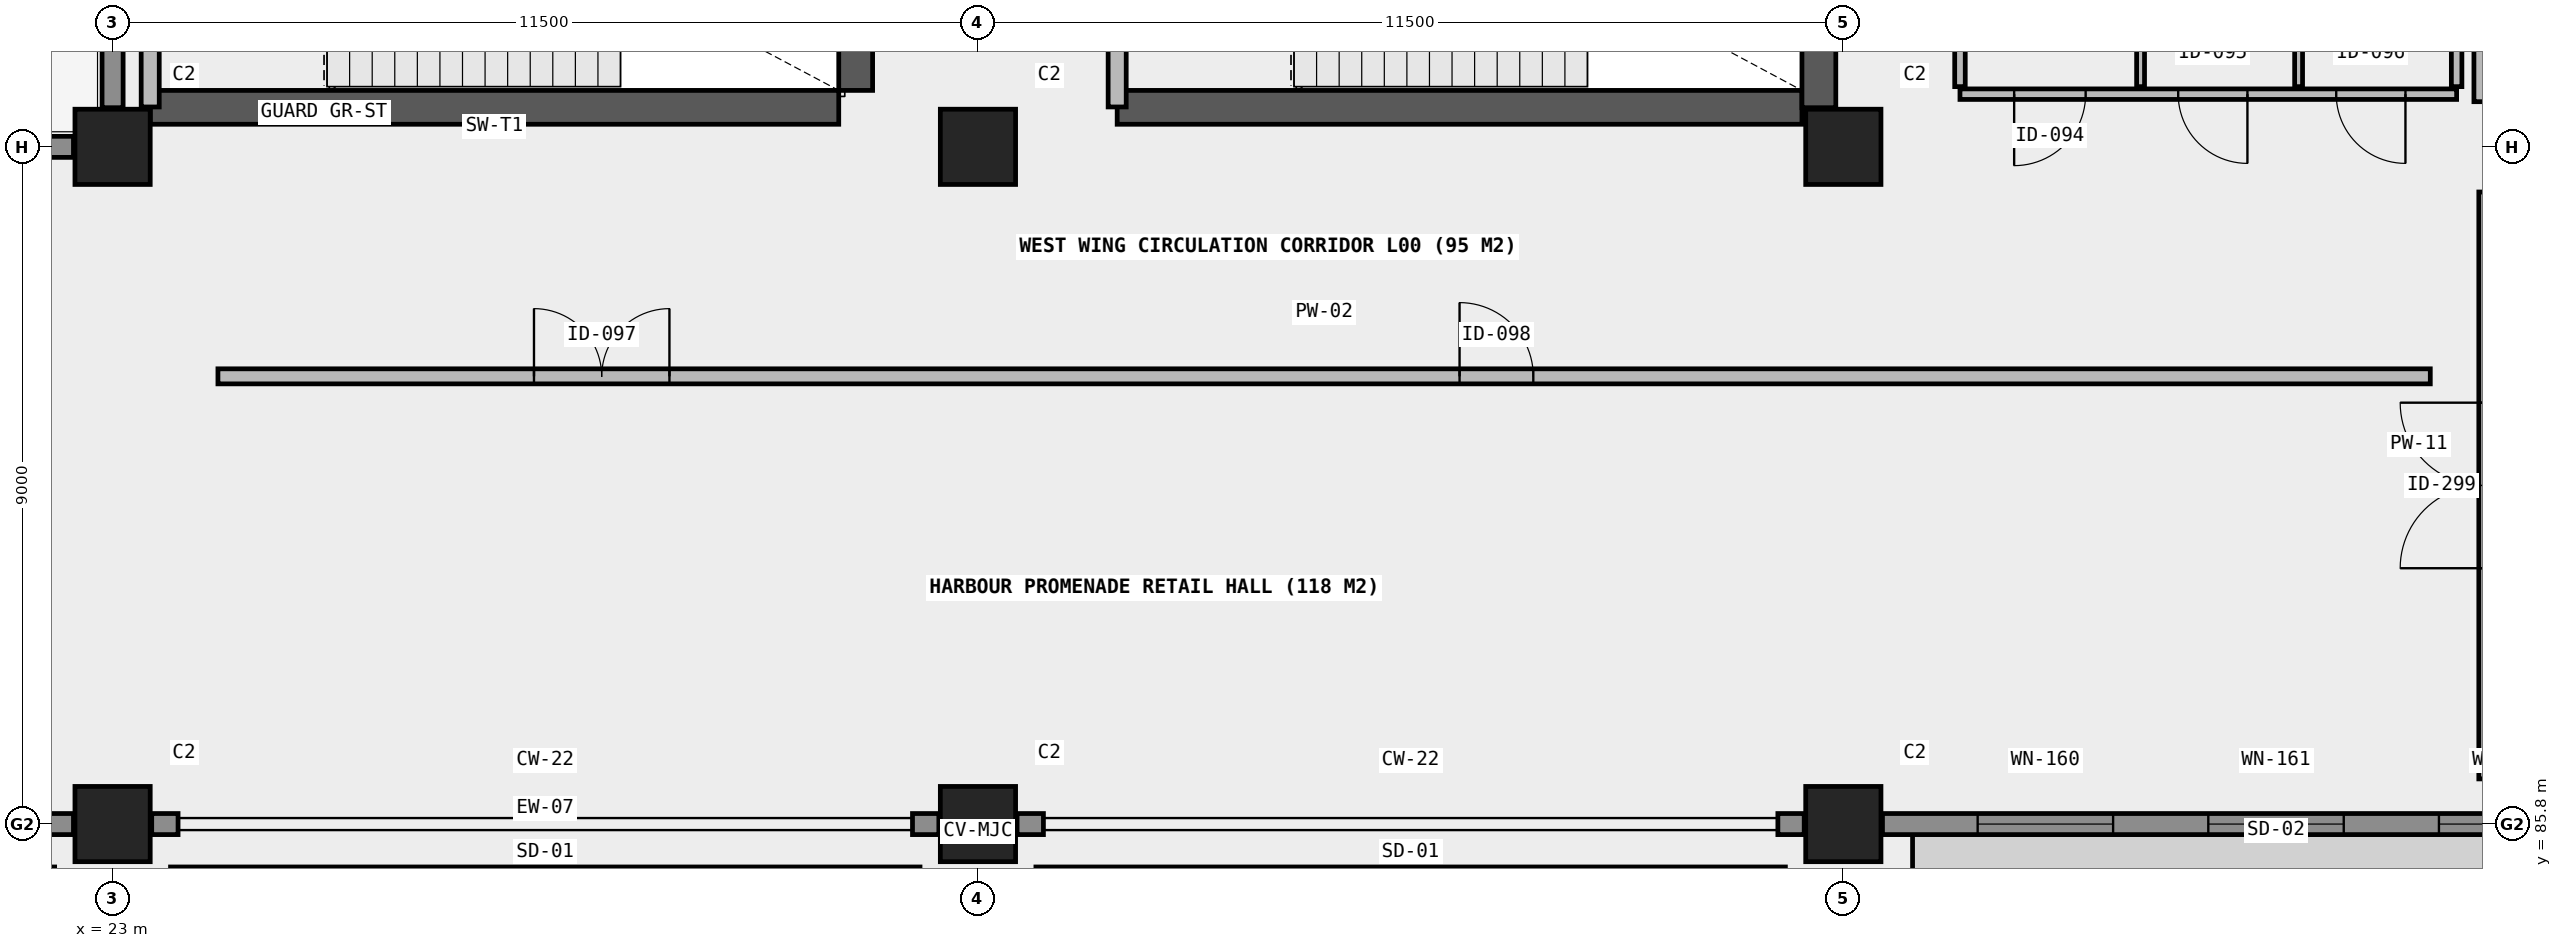
"""IFC4 building model, lengths in metres.
Left out: names, types, materials, properties, quantities, classifications, styles, units other than length and angle.
Written with IfcOpenShell. Run it as: python <this file> out.ifc"""

import sys

from ifc_helpers import new_model, si_unit, direction, frame, frame_2d, origin, origin_2d, place, context, subcontext, project, spatial, rectangle, extrude, element, fill, save


model = new_model("IFC4")
c1 = context("Model", 3, precision=1e-05, world=origin(), true_north=direction((0.0, 1.0)))
c2 = subcontext(c1, "Body", "Model", "MODEL_VIEW")
j1 = project(units=[si_unit("LENGTHUNIT", "METRE"), si_unit("PLANEANGLEUNIT", "RADIAN")], contexts=[c1])
p1 = place(None, origin())
s1 = spatial("IfcSite", under=j1, at=p1, CompositionType="ELEMENT")
p2 = place(p1, origin())
s2 = spatial("IfcBuilding", under=s1, at=p2, CompositionType="ELEMENT")
p3 = place(p2, origin())
s3 = spatial("IfcBuildingStorey", under=s2, at=p3, CompositionType="ELEMENT", Elevation=0.0)
for number, where, z_axis, x_axis in (
    (1, (23.0, 85.8, 0.0), (0.0, 0.0, 1.0), (1.0, 0.0, 0.0)),
    (2, (23.0, 94.8, 0.0), (0.0, 0.0, 1.0), (1.0, 0.0, 0.0)),
    (3, (34.5, 85.8, 0.0), (0.0, 0.0, 1.0), (1.0, 0.0, 0.0)),
    (4, (34.5, 94.8, 0.0), (0.0, 0.0, 1.0), (1.0, 0.0, 0.0)),
    (5, (46.0, 85.8, 0.0), (0.0, 0.0, 1.0), (1.0, 0.0, 0.0)),
    (6, (46.0, 94.8, 0.0), (0.0, 0.0, 1.0), (1.0, 0.0, 0.0)),
):
    element("IfcColumn", number, at=place(p3, frame(where, z_axis=z_axis, x_axis=x_axis)), inside=s3, PredefinedType="COLUMN", context=c2, shape_type="SweptSolid", body=[
        extrude(rectangle(XDim=1.0, YDim=1.0, at=origin_2d()), origin(), (0.0, 0.0, 1.0), 4.2),
    ])
p4 = place(p3, frame((23.5, 95.325, 0.0), z_axis=(0.0, 0.0, 1.0), x_axis=(1.0, 0.0, 0.0)))
e7 = element("IfcWall", 7, at=p4, inside=s3, PredefinedType="SHEAR", context=c2, shape_type="SweptSolid", body=[
    extrude(rectangle(XDim=9.15, YDim=0.45, at=frame_2d((4.575, 0.0))), origin(), (0.0, 0.0, 1.0), 4.2),
])
p5 = place(p3, frame((32.875, 95.55, 0.0), z_axis=(0.0, 0.0, 1.0), x_axis=(0.0, 1.0, 0.0)))
e8 = element("IfcWall", 8, at=p5, inside=s3, PredefinedType="SHEAR", context=c2, shape_type="SweptSolid", body=[
    extrude(rectangle(XDim=3.6, YDim=0.45, at=frame_2d((1.8, 0.0))), origin(), (0.0, 0.0, 1.0), 4.2),
])
p6 = place(p3, frame((36.35, 95.325, 0.0), z_axis=(0.0, 0.0, 1.0), x_axis=(1.0, 0.0, 0.0)))
e9 = element("IfcWall", 9, at=p6, inside=s3, PredefinedType="SHEAR", context=c2, shape_type="SweptSolid", body=[
    extrude(rectangle(XDim=9.1, YDim=0.45, at=frame_2d((4.55, 0.0))), origin(), (0.0, 0.0, 1.0), 4.2),
])
p7 = place(p3, frame((45.675, 95.32, 0.0), z_axis=(0.0, 0.0, 1.0), x_axis=(0.0, 1.0, 0.0)))
e10 = element("IfcWall", 10, at=p7, inside=s3, PredefinedType="SHEAR", context=c2, shape_type="SweptSolid", body=[
    extrude(rectangle(XDim=3.83, YDim=0.45, at=frame_2d((1.915, 0.0))), origin(), (0.0, 0.0, 1.0), 4.2),
])
p8 = place(p3, frame((12.02, 85.8, 0.0), z_axis=(0.0, 0.0, 1.0), x_axis=(1.0, 0.0, 0.0)))
e11 = element("IfcWall", 11, at=p8, inside=s3, PredefinedType="SOLIDWALL", context=c2, shape_type="SweptSolid", body=[
    extrude(rectangle(XDim=10.46, YDim=0.28, at=frame_2d((5.23, 0.0))), origin(), (0.0, 0.0, 1.0), 3.15),
])
p9 = place(p8, frame((1.265, 0.0, 0.85)))
e12 = element("IfcOpeningElement", 12, at=p9, cuts=e11, PredefinedType="OPENING", context=c2, shape_type="SweptSolid", body=[
    extrude(rectangle(XDim=1.8, YDim=1.95, at=frame_2d((0.9, 0.975))), frame((0.0, 0.15, 0.0), z_axis=(0.0, -1.0, 0.0), x_axis=(1.0, 0.0, 0.0)), (0.0, 0.0, 1.0), 0.3),
])
p10 = place(p8, frame((4.33, 0.0, 0.85)))
e13 = element("IfcOpeningElement", 13, at=p10, cuts=e11, PredefinedType="OPENING", context=c2, shape_type="SweptSolid", body=[
    extrude(rectangle(XDim=1.8, YDim=1.95, at=frame_2d((0.9, 0.975))), frame((0.0, 0.15, 0.0), z_axis=(0.0, -1.0, 0.0), x_axis=(1.0, 0.0, 0.0)), (0.0, 0.0, 1.0), 0.3),
])
p11 = place(p8, frame((7.395, 0.0, 0.85)))
e14 = element("IfcOpeningElement", 14, at=p11, cuts=e11, PredefinedType="OPENING", context=c2, shape_type="SweptSolid", body=[
    extrude(rectangle(XDim=1.8, YDim=1.95, at=frame_2d((0.9, 0.975))), frame((0.0, 0.15, 0.0), z_axis=(0.0, -1.0, 0.0), x_axis=(1.0, 0.0, 0.0)), (0.0, 0.0, 1.0), 0.3),
])
for number, where, z_axis, x_axis in (
    (15, (23.52, 85.8, 0.0), (0.0, 0.0, 1.0), (1.0, 0.0, 0.0)),
    (16, (33.63, 85.8, 0.0), (0.0, 0.0, 1.0), (1.0, 0.0, 0.0)),
    (17, (35.02, 85.8, 0.0), (0.0, 0.0, 1.0), (1.0, 0.0, 0.0)),
    (18, (45.13, 85.8, 0.0), (0.0, 0.0, 1.0), (1.0, 0.0, 0.0)),
):
    element("IfcWall", number, at=place(p3, frame(where, z_axis=z_axis, x_axis=x_axis)), inside=s3, PredefinedType="SOLIDWALL", context=c2, shape_type="SweptSolid", body=[
        extrude(rectangle(XDim=0.35, YDim=0.28, at=frame_2d((0.175, 0.0))), origin(), (0.0, 0.0, 1.0), 3.93),
    ])
p12 = place(p3, frame((46.52, 85.8, 0.0), z_axis=(0.0, 0.0, 1.0), x_axis=(1.0, 0.0, 0.0)))
e19 = element("IfcWall", 19, at=p12, inside=s3, PredefinedType="SOLIDWALL", context=c2, shape_type="SweptSolid", body=[
    extrude(rectangle(XDim=10.46, YDim=0.28, at=frame_2d((5.23, 0.0))), origin(), (0.0, 0.0, 1.0), 3.15),
])
p13 = place(p12, frame((1.265, 0.0, 0.85)))
e20 = element("IfcOpeningElement", 20, at=p13, cuts=e19, PredefinedType="OPENING", context=c2, shape_type="SweptSolid", body=[
    extrude(rectangle(XDim=1.8, YDim=1.95, at=frame_2d((0.9, 0.975))), frame((0.0, 0.15, 0.0), z_axis=(0.0, -1.0, 0.0), x_axis=(1.0, 0.0, 0.0)), (0.0, 0.0, 1.0), 0.3),
])
p14 = place(p12, frame((4.33, 0.0, 0.85)))
e21 = element("IfcOpeningElement", 21, at=p14, cuts=e19, PredefinedType="OPENING", context=c2, shape_type="SweptSolid", body=[
    extrude(rectangle(XDim=1.8, YDim=1.95, at=frame_2d((0.9, 0.975))), frame((0.0, 0.15, 0.0), z_axis=(0.0, -1.0, 0.0), x_axis=(1.0, 0.0, 0.0)), (0.0, 0.0, 1.0), 0.3),
])
p15 = place(p12, frame((7.395, 0.0, 0.85)))
e22 = element("IfcOpeningElement", 22, at=p15, cuts=e19, PredefinedType="OPENING", context=c2, shape_type="SweptSolid", body=[
    extrude(rectangle(XDim=1.8, YDim=1.95, at=frame_2d((0.9, 0.975))), frame((0.0, 0.15, 0.0), z_axis=(0.0, -1.0, 0.0), x_axis=(1.0, 0.0, 0.0)), (0.0, 0.0, 1.0), 0.3),
])
p16 = place(p3, frame((23.0, 95.32, 0.0), z_axis=(0.0, 0.0, 1.0), x_axis=(0.0, 1.0, 0.0)))
e23 = element("IfcWall", 23, at=p16, inside=s3, PredefinedType="SOLIDWALL", context=c2, shape_type="SweptSolid", body=[
    extrude(rectangle(XDim=8.96, YDim=0.28, at=frame_2d((4.48, 0.0))), origin(), (0.0, 0.0, 1.0), 3.15),
])
p17 = place(p16, frame((4.447, 0.0, 0.0)))
e24 = element("IfcOpeningElement", 24, at=p17, cuts=e23, PredefinedType="OPENING", context=c2, shape_type="SweptSolid", body=[
    extrude(rectangle(XDim=1.5, YDim=2.3, at=frame_2d((0.75, 1.15))), frame((0.0, 0.15, 0.0), z_axis=(0.0, -1.0, 0.0), x_axis=(1.0, 0.0, 0.0)), (0.0, 0.0, 1.0), 0.3),
])
p18 = place(p16, frame((1.323, 0.0, 0.78)))
e25 = element("IfcOpeningElement", 25, at=p18, cuts=e23, PredefinedType="OPENING", context=c2, shape_type="SweptSolid", body=[
    extrude(rectangle(XDim=1.8, YDim=1.95, at=frame_2d((0.9, 0.975))), frame((0.0, 0.15, 0.0), z_axis=(0.0, -1.0, 0.0), x_axis=(1.0, 0.0, 0.0)), (0.0, 0.0, 1.0), 0.3),
])
p19 = place(p3, frame((12.02, 94.8, 0.0), z_axis=(0.0, 0.0, 1.0), x_axis=(1.0, 0.0, 0.0)))
e26 = element("IfcWall", 26, at=p19, inside=s3, PredefinedType="SOLIDWALL", context=c2, shape_type="SweptSolid", body=[
    extrude(rectangle(XDim=10.46, YDim=0.28, at=frame_2d((5.23, 0.0))), origin(), (0.0, 0.0, 1.0), 3.15),
])
p20 = place(p19, frame((4.28, 0.0, 0.0)))
e27 = element("IfcOpeningElement", 27, at=p20, cuts=e26, PredefinedType="OPENING", context=c2, shape_type="SweptSolid", body=[
    extrude(rectangle(XDim=1.9, YDim=2.2, at=frame_2d((0.95, 1.1))), frame((0.0, 0.15, 0.0), z_axis=(0.0, -1.0, 0.0), x_axis=(1.0, 0.0, 0.0)), (0.0, 0.0, 1.0), 0.3),
])
p21 = place(p19, frame((1.24, 0.0, 0.78)))
e28 = element("IfcOpeningElement", 28, at=p21, cuts=e26, PredefinedType="OPENING", context=c2, shape_type="SweptSolid", body=[
    extrude(rectangle(XDim=1.8, YDim=1.95, at=frame_2d((0.9, 0.975))), frame((0.0, 0.15, 0.0), z_axis=(0.0, -1.0, 0.0), x_axis=(1.0, 0.0, 0.0)), (0.0, 0.0, 1.0), 0.3),
])
p22 = place(p3, frame((23.5, 95.33, 0.0), z_axis=(0.0, 0.0, 1.0), x_axis=(0.0, 1.0, 0.0)))
e29 = element("IfcWall", 29, at=p22, inside=s3, PredefinedType="SOLIDWALL", context=c2, shape_type="SweptSolid", body=[
    extrude(rectangle(XDim=4.04, YDim=0.24, at=frame_2d((2.02, 0.0))), origin(), (0.0, 0.0, 1.0), 3.88),
])
p23 = place(p22, frame((1.45, 0.0, 0.0)))
e30 = element("IfcOpeningElement", 30, at=p23, cuts=e29, PredefinedType="OPENING", context=c2, shape_type="SweptSolid", body=[
    extrude(rectangle(XDim=1.13, YDim=2.15, at=frame_2d((0.565, 1.075))), frame((0.0, 0.13, 0.0), z_axis=(0.0, -1.0, 0.0), x_axis=(1.0, 0.0, 0.0)), (0.0, 0.0, 1.0), 0.26),
])
p24 = place(p3, frame((36.35, 95.33, 0.0), z_axis=(0.0, 0.0, 1.0), x_axis=(0.0, 1.0, 0.0)))
e31 = element("IfcWall", 31, at=p24, inside=s3, PredefinedType="SOLIDWALL", context=c2, shape_type="SweptSolid", body=[
    extrude(rectangle(XDim=4.04, YDim=0.24, at=frame_2d((2.02, 0.0))), origin(), (0.0, 0.0, 1.0), 3.88),
])
p25 = place(p24, frame((1.45, 0.0, 0.0)))
e32 = element("IfcOpeningElement", 32, at=p25, cuts=e31, PredefinedType="OPENING", context=c2, shape_type="SweptSolid", body=[
    extrude(rectangle(XDim=1.13, YDim=2.15, at=frame_2d((0.565, 1.075))), frame((0.0, 0.13, 0.0), z_axis=(0.0, -1.0, 0.0), x_axis=(1.0, 0.0, 0.0)), (0.0, 0.0, 1.0), 0.26),
])
p26 = place(p3, frame((47.55, 95.5, 0.0), z_axis=(0.0, 0.0, 1.0), x_axis=(1.0, 0.0, 0.0)))
e33 = element("IfcWall", 33, at=p26, inside=s3, PredefinedType="PLUMBINGWALL", context=c2, shape_type="SweptSolid", body=[
    extrude(rectangle(XDim=6.6, YDim=0.14, at=frame_2d((3.3, 0.0))), origin(), (0.0, 0.0, 1.0), 3.88),
])
p27 = place(p26, frame((0.72, 0.0, 0.0)))
e34 = element("IfcOpeningElement", 34, at=p27, cuts=e33, PredefinedType="OPENING", context=c2, shape_type="SweptSolid", body=[
    extrude(rectangle(XDim=0.95, YDim=2.1, at=frame_2d((0.475, 1.05))), frame((0.0, 0.08, 0.0), z_axis=(0.0, -1.0, 0.0), x_axis=(1.0, 0.0, 0.0)), (0.0, 0.0, 1.0), 0.16),
])
p28 = place(p26, frame((2.9, 0.0, 0.0)))
e35 = element("IfcOpeningElement", 35, at=p28, cuts=e33, PredefinedType="OPENING", context=c2, shape_type="SweptSolid", body=[
    extrude(rectangle(XDim=0.92, YDim=2.1, at=frame_2d((0.46, 1.05))), frame((0.0, 0.08, 0.0), z_axis=(0.0, -1.0, 0.0), x_axis=(1.0, 0.0, 0.0)), (0.0, 0.0, 1.0), 0.16),
])
p29 = place(p26, frame((5.0, 0.0, 0.0)))
e36 = element("IfcOpeningElement", 36, at=p29, cuts=e33, PredefinedType="OPENING", context=c2, shape_type="SweptSolid", body=[
    extrude(rectangle(XDim=0.92, YDim=2.1, at=frame_2d((0.46, 1.05))), frame((0.0, 0.08, 0.0), z_axis=(0.0, -1.0, 0.0), x_axis=(1.0, 0.0, 0.0)), (0.0, 0.0, 1.0), 0.16),
])
p30 = place(p3, frame((47.55, 95.6, 0.0), z_axis=(0.0, 0.0, 1.0), x_axis=(0.0, 1.0, 0.0)))
e37 = element("IfcWall", 37, at=p30, inside=s3, PredefinedType="PLUMBINGWALL", context=c2, shape_type="SweptSolid", body=[
    extrude(rectangle(XDim=2.85, YDim=0.14, at=frame_2d((1.425, 0.0))), origin(), (0.0, 0.0, 1.0), 3.88),
])
p31 = place(p3, frame((49.95, 95.6, 0.0), z_axis=(0.0, 0.0, 1.0), x_axis=(0.0, 1.0, 0.0)))
e38 = element("IfcWall", 38, at=p31, inside=s3, PredefinedType="PARTITIONING", context=c2, shape_type="SweptSolid", body=[
    extrude(rectangle(XDim=2.85, YDim=0.105, at=frame_2d((1.425, 0.0))), origin(), (0.0, 0.0, 1.0), 3.4),
])
p32 = place(p3, frame((52.05, 95.6, 0.0), z_axis=(0.0, 0.0, 1.0), x_axis=(0.0, 1.0, 0.0)))
e39 = element("IfcWall", 39, at=p32, inside=s3, PredefinedType="PARTITIONING", context=c2, shape_type="SweptSolid", body=[
    extrude(rectangle(XDim=2.85, YDim=0.105, at=frame_2d((1.425, 0.0))), origin(), (0.0, 0.0, 1.0), 3.88),
])
p33 = place(p3, frame((54.15, 95.6, 0.0), z_axis=(0.0, 0.0, 1.0), x_axis=(0.0, 1.0, 0.0)))
e40 = element("IfcWall", 40, at=p33, inside=s3, PredefinedType="PLUMBINGWALL", context=c2, shape_type="SweptSolid", body=[
    extrude(rectangle(XDim=2.85, YDim=0.14, at=frame_2d((1.425, 0.0))), origin(), (0.0, 0.0, 1.0), 3.88),
])
p34 = place(p3, frame((24.4, 91.75, 0.0), z_axis=(0.0, 0.0, 1.0), x_axis=(1.0, 0.0, 0.0)))
e41 = element("IfcWall", 41, at=p34, inside=s3, PredefinedType="PARTITIONING", context=c2, shape_type="SweptSolid", body=[
    extrude(rectangle(XDim=29.4, YDim=0.2, at=frame_2d((14.7, 0.0))), origin(), (0.0, 0.0, 1.0), 3.88),
])
p35 = place(p34, frame((4.2, 0.0, 0.0)))
e42 = element("IfcOpeningElement", 42, at=p35, cuts=e41, PredefinedType="OPENING", context=c2, shape_type="SweptSolid", body=[
    extrude(rectangle(XDim=1.8, YDim=2.2, at=frame_2d((0.9, 1.1))), frame((0.0, 0.11, 0.0), z_axis=(0.0, -1.0, 0.0), x_axis=(1.0, 0.0, 0.0)), (0.0, 0.0, 1.0), 0.22),
])
p36 = place(p34, frame((16.5, 0.0, 0.0)))
e43 = element("IfcOpeningElement", 43, at=p36, cuts=e41, PredefinedType="OPENING", context=c2, shape_type="SweptSolid", body=[
    extrude(rectangle(XDim=0.98, YDim=2.15, at=frame_2d((0.49, 1.075))), frame((0.0, 0.11, 0.0), z_axis=(0.0, -1.0, 0.0), x_axis=(1.0, 0.0, 0.0)), (0.0, 0.0, 1.0), 0.22),
])
p37 = place(p3, frame((54.5, 86.4, 0.0), z_axis=(0.0, 0.0, 1.0), x_axis=(0.0, 1.0, 0.0)))
e44 = element("IfcWall", 44, at=p37, inside=s3, PredefinedType="MOVABLE", context=c2, shape_type="SweptSolid", body=[
    extrude(rectangle(XDim=7.8, YDim=0.11, at=frame_2d((3.9, 0.0))), origin(), (0.0, 0.0, 1.0), 3.88),
])
p38 = place(p37, frame((2.8, 0.0, 0.0)))
e45 = element("IfcOpeningElement", 45, at=p38, cuts=e44, PredefinedType="OPENING", context=c2, shape_type="SweptSolid", body=[
    extrude(rectangle(XDim=2.2, YDim=2.4, at=frame_2d((1.1, 1.2))), frame((0.0, 0.065, 0.0), z_axis=(0.0, -1.0, 0.0), x_axis=(1.0, 0.0, 0.0)), (0.0, 0.0, 1.0), 0.13),
])
p39 = place(p3, frame((54.5, 95.4, 0.0), z_axis=(0.0, 0.0, 1.0), x_axis=(0.0, 1.0, 0.0)))
e46 = element("IfcWall", 46, at=p39, inside=s3, PredefinedType="SOLIDWALL", context=c2, shape_type="SweptSolid", body=[
    extrude(rectangle(XDim=9.12, YDim=0.24, at=frame_2d((4.56, 0.0))), origin(), (0.0, 0.0, 1.0), 3.88),
])
p40 = place(p13, origin())
e47 = element("IfcWindow", 47, at=p40, inside=s3, PartitioningType="SINGLE_PANEL", PredefinedType="WINDOW", context=c2, shape_type="SweptSolid", body=[
    extrude(rectangle(XDim=1.8, YDim=1.95, at=frame_2d((0.9, 0.975))), frame((0.0, 0.03, 0.0), z_axis=(0.0, -1.0, 0.0), x_axis=(1.0, 0.0, 0.0)), (0.0, 0.0, 1.0), 0.06),
])
fill(e20, e47)
p41 = place(p14, origin())
e48 = element("IfcWindow", 48, at=p41, inside=s3, PartitioningType="SINGLE_PANEL", PredefinedType="WINDOW", context=c2, shape_type="SweptSolid", body=[
    extrude(rectangle(XDim=1.8, YDim=1.95, at=frame_2d((0.9, 0.975))), frame((0.0, 0.03, 0.0), z_axis=(0.0, -1.0, 0.0), x_axis=(1.0, 0.0, 0.0)), (0.0, 0.0, 1.0), 0.06),
])
fill(e21, e48)
p42 = place(p15, origin())
e49 = element("IfcWindow", 49, at=p42, inside=s3, PartitioningType="SINGLE_PANEL", PredefinedType="WINDOW", context=c2, shape_type="SweptSolid", body=[
    extrude(rectangle(XDim=1.8, YDim=1.95, at=frame_2d((0.9, 0.975))), frame((0.0, 0.03, 0.0), z_axis=(0.0, -1.0, 0.0), x_axis=(1.0, 0.0, 0.0)), (0.0, 0.0, 1.0), 0.06),
])
fill(e22, e49)
p43 = place(p27, frame((0.475, 0.0, 0.0), z_axis=(0.0, 0.0, 1.0), x_axis=(-1.0, 0.0, 0.0)))
e50 = element("IfcDoor", 50, at=p43, inside=s3, OperationType="SINGLE_SWING_LEFT", PredefinedType="DOOR", context=c2, shape_type="SweptSolid", body=[
    extrude(rectangle(XDim=0.95, YDim=2.1, at=frame_2d((0.0, 1.05))), frame((0.0, 0.025, 0.0), z_axis=(0.0, -1.0, 0.0), x_axis=(1.0, 0.0, 0.0)), (0.0, 0.0, 1.0), 0.05),
])
fill(e34, e50)
p44 = place(p28, origin())
e51 = element("IfcDoor", 51, at=p44, inside=s3, OperationType="SINGLE_SWING_RIGHT", PredefinedType="DOOR", context=c2, shape_type="SweptSolid", body=[
    extrude(rectangle(XDim=0.92, YDim=2.1, at=frame_2d((0.46, 1.05))), frame((0.0, 0.025, 0.0), z_axis=(0.0, -1.0, 0.0), x_axis=(1.0, 0.0, 0.0)), (0.0, 0.0, 1.0), 0.05),
])
fill(e35, e51)
p45 = place(p29, origin())
e52 = element("IfcDoor", 52, at=p45, inside=s3, OperationType="SINGLE_SWING_RIGHT", PredefinedType="DOOR", context=c2, shape_type="SweptSolid", body=[
    extrude(rectangle(XDim=0.92, YDim=2.1, at=frame_2d((0.46, 1.05))), frame((0.0, 0.025, 0.0), z_axis=(0.0, -1.0, 0.0), x_axis=(1.0, 0.0, 0.0)), (0.0, 0.0, 1.0), 0.05),
])
fill(e36, e52)
p46 = place(p35, origin())
e53 = element("IfcDoor", 53, at=p46, inside=s3, OperationType="DOUBLE_DOOR_SINGLE_SWING", PredefinedType="DOOR", context=c2, shape_type="SweptSolid", body=[
    extrude(rectangle(XDim=1.8, YDim=2.2, at=frame_2d((0.9, 1.1))), frame((0.0, 0.025, 0.0), z_axis=(0.0, -1.0, 0.0), x_axis=(1.0, 0.0, 0.0)), (0.0, 0.0, 1.0), 0.05),
])
fill(e42, e53)
p47 = place(p36, origin())
e54 = element("IfcDoor", 54, at=p47, inside=s3, OperationType="SINGLE_SWING_LEFT", PredefinedType="DOOR", context=c2, shape_type="SweptSolid", body=[
    extrude(rectangle(XDim=0.98, YDim=2.15, at=frame_2d((0.49, 1.075))), frame((0.0, 0.025, 0.0), z_axis=(0.0, -1.0, 0.0), x_axis=(1.0, 0.0, 0.0)), (0.0, 0.0, 1.0), 0.05),
])
fill(e43, e54)
p48 = place(p38, origin())
e55 = element("IfcDoor", 55, at=p48, inside=s3, OperationType="DOUBLE_DOOR_SINGLE_SWING", PredefinedType="DOOR", context=c2, shape_type="SweptSolid", body=[
    extrude(rectangle(XDim=2.2, YDim=2.4, at=frame_2d((1.1, 1.2))), frame((0.0, 0.025, 0.0), z_axis=(0.0, -1.0, 0.0), x_axis=(1.0, 0.0, 0.0)), (0.0, 0.0, 1.0), 0.05),
])
fill(e45, e55)
save(model, sys.argv[1])
